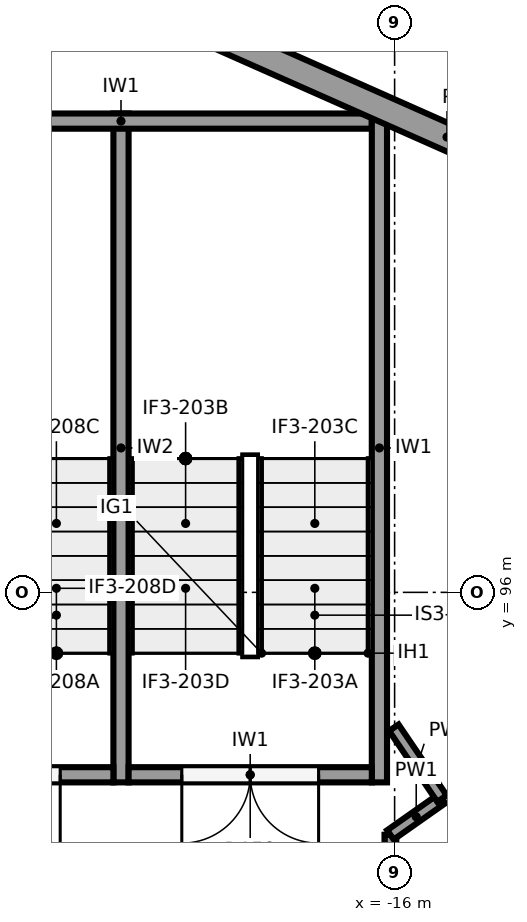
"""IFC4 building model, lengths in metres.
Left out: names, types, materials, properties, quantities, classifications, styles, units other than length and angle.
Written with IfcOpenShell. Run it as: python <this file> out.ifc"""

import sys

from ifc_helpers import new_model, si_unit, direction, frame, frame_2d, origin, place, context, subcontext, project, spatial, rectangle, extrude, element, fill, save


model = new_model("IFC4")
c1 = context("Model", 3, precision=1e-05, world=origin(), true_north=direction((0.0, 1.0)))
c2 = subcontext(c1, "Body", "Model", "MODEL_VIEW")
j1 = project(units=[si_unit("LENGTHUNIT", "METRE"), si_unit("PLANEANGLEUNIT", "RADIAN")], contexts=[c1])
p1 = place(None, origin())
s1 = spatial("IfcSite", under=j1, at=p1, CompositionType="ELEMENT")
p2 = place(p1, origin())
s2 = spatial("IfcBuilding", under=s1, at=p2, CompositionType="ELEMENT")
p3 = place(p2, frame((0.0, 0.0, 6.5)))
s3 = spatial("IfcBuildingStorey", under=s2, at=p3, CompositionType="ELEMENT", Elevation=6.5)
p4 = place(p3, frame((-22.543, 105.198, 0.0), z_axis=(0.0, 0.0, 1.0), x_axis=(0.914138897099, -0.405401130748, 0.0)))
e1 = element("IfcWall", 1, at=p4, inside=s3, PredefinedType="SOLIDWALL", context=c2, shape_type="SweptSolid", body=[
    extrude(rectangle(XDim=15.824, YDim=0.35, at=frame_2d((7.912, 0.0))), origin(), (0.0, 0.0, 1.0), 3.85),
])
p5 = place(p4, frame((11.474, 0.0, 0.0)))
e2 = element("IfcOpeningElement", 2, at=p5, cuts=e1, PredefinedType="OPENING", context=c2, shape_type="SweptSolid", body=[
    extrude(rectangle(XDim=2.4, YDim=2.8, at=frame_2d((1.2, 1.4))), frame((0.0, 0.185, 0.0), z_axis=(0.0, -1.0, 0.0), x_axis=(1.0, 0.0, 0.0)), (0.0, 0.0, 1.0), 0.37),
])
p6 = place(p3, frame((-16.2, 102.3, 0.0), z_axis=(0.0, 0.0, 1.0), x_axis=(0.0, -1.0, 0.0)))
e3 = element("IfcWall", 3, at=p6, inside=s3, PredefinedType="SHEAR", context=c2, shape_type="SweptSolid", body=[
    extrude(rectangle(XDim=8.8, YDim=0.2, at=frame_2d((4.4, 0.0))), origin(), (0.0, 0.0, 1.0), 5.15),
])
p7 = place(p3, frame((-16.3, 102.2, 0.0), z_axis=(0.0, 0.0, 1.0), x_axis=(-1.0, 0.0, 0.0)))
e4 = element("IfcWall", 4, at=p7, inside=s3, PredefinedType="SHEAR", context=c2, shape_type="SweptSolid", body=[
    extrude(rectangle(XDim=6.6, YDim=0.2, at=frame_2d((3.3, 0.0))), origin(), (0.0, 0.0, 1.0), 5.15),
])
p8 = place(p3, frame((-19.6, 102.3, 0.0), z_axis=(0.0, 0.0, 1.0), x_axis=(0.0, -1.0, 0.0)))
e5 = element("IfcWall", 5, at=p8, inside=s3, PredefinedType="SHEAR", context=c2, shape_type="SweptSolid", body=[
    extrude(rectangle(XDim=8.8, YDim=0.2, at=frame_2d((4.4, 0.0))), origin(), (0.0, 0.0, 1.0), 5.15),
])
p9 = place(p3, frame((-16.3, 93.6, 0.0), z_axis=(0.0, 0.0, 1.0), x_axis=(-1.0, 0.0, 0.0)))
e6 = element("IfcWall", 6, at=p9, inside=s3, PredefinedType="SHEAR", context=c2, shape_type="SweptSolid", body=[
    extrude(rectangle(XDim=3.2, YDim=0.2, at=frame_2d((1.6, 0.0))), origin(), (0.0, 0.0, 1.0), 5.15),
])
p10 = place(p9, frame((0.7, 0.0, 0.0)))
e7 = element("IfcOpeningElement", 7, at=p10, cuts=e6, PredefinedType="OPENING", context=c2, shape_type="SweptSolid", body=[
    extrude(rectangle(XDim=1.8, YDim=2.1, at=frame_2d((0.9, 1.05))), frame((0.0, 0.11, 0.0), z_axis=(0.0, -1.0, 0.0), x_axis=(1.0, 0.0, 0.0)), (0.0, 0.0, 1.0), 0.22),
])
p11 = place(p3, frame((-19.7, 93.6, 0.0), z_axis=(0.0, 0.0, 1.0), x_axis=(-1.0, 0.0, 0.0)))
e8 = element("IfcWall", 8, at=p11, inside=s3, PredefinedType="SHEAR", context=c2, shape_type="SweptSolid", body=[
    extrude(rectangle(XDim=3.2, YDim=0.2, at=frame_2d((1.6, 0.0))), origin(), (0.0, 0.0, 1.0), 5.15),
])
p12 = place(p11, frame((0.7, 0.0, 0.0)))
e9 = element("IfcOpeningElement", 9, at=p12, cuts=e8, PredefinedType="OPENING", context=c2, shape_type="SweptSolid", body=[
    extrude(rectangle(XDim=1.8, YDim=2.1, at=frame_2d((0.9, 1.05))), frame((0.0, 0.11, 0.0), z_axis=(0.0, -1.0, 0.0), x_axis=(1.0, 0.0, 0.0)), (0.0, 0.0, 1.0), 0.22),
])
p13 = place(p3, frame((-16.055, 88.71, 0.0), z_axis=(0.0, 0.0, 1.0), x_axis=(0.0, 1.0, 0.0)))
e10 = element("IfcWall", 10, at=p13, inside=s3, PredefinedType="PARTITIONING", context=c2, shape_type="SweptSolid", body=[
    extrude(rectangle(XDim=4.099, YDim=0.15, at=frame_2d((2.05, 0.0))), origin(), (0.0, 0.0, 1.0), 3.85),
])
p14 = place(p3, frame((-16.055, 90.532, 3.85), z_axis=(0.0, 0.0, 1.0), x_axis=(0.0, 1.0, 0.0)))
e11 = element("IfcWall", 11, at=p14, inside=s3, PredefinedType="PARTITIONING", context=c2, shape_type="SweptSolid", body=[
    extrude(rectangle(XDim=2.277, YDim=0.15, at=frame_2d((1.139, 0.0))), origin(), (0.0, 0.0, 1.0), 1.3),
])
p15 = place(p3, frame((-16.055, 92.809, 0.0), z_axis=(0.0, 0.0, 1.0), x_axis=(0.81774999294, 0.575573582652, 0.0)))
e12 = element("IfcWall", 12, at=p15, inside=s3, PredefinedType="PARTITIONING", context=c2, shape_type="SweptSolid", body=[
    extrude(rectangle(XDim=0.83, YDim=0.15, at=frame_2d((0.415, 0.0))), origin(), (0.0, 0.0, 1.0), 5.15),
])
p16 = place(p3, frame((-15.376, 93.287, 0.0), z_axis=(0.0, 0.0, 1.0), x_axis=(-0.562120553728, 0.827055308354, 0.0)))
e13 = element("IfcWall", 13, at=p16, inside=s3, PredefinedType="PARTITIONING", context=c2, shape_type="SweptSolid", body=[
    extrude(rectangle(XDim=1.128, YDim=0.15, at=frame_2d((0.564, 0.0))), origin(), (0.0, 0.0, 1.0), 5.15),
])
p17 = place(p10, origin())
e14 = element("IfcDoor", 14, at=p17, inside=s3, OperationType="DOUBLE_DOOR_SINGLE_SWING", PredefinedType="DOOR", context=c2, shape_type="SweptSolid", body=[
    extrude(rectangle(XDim=1.8, YDim=2.1, at=frame_2d((0.9, 1.05))), frame((0.0, 0.025, 0.0), z_axis=(0.0, -1.0, 0.0), x_axis=(1.0, 0.0, 0.0)), (0.0, 0.0, 1.0), 0.05),
])
fill(e7, e14)
p18 = place(p12, origin())
e15 = element("IfcDoor", 15, at=p18, inside=s3, OperationType="DOUBLE_DOOR_SINGLE_SWING", PredefinedType="DOOR", context=c2, shape_type="SweptSolid", body=[
    extrude(rectangle(XDim=1.8, YDim=2.1, at=frame_2d((0.9, 1.05))), frame((0.0, 0.025, 0.0), z_axis=(0.0, -1.0, 0.0), x_axis=(1.0, 0.0, 0.0)), (0.0, 0.0, 1.0), 0.05),
])
fill(e9, e15)
save(model, sys.argv[1])
